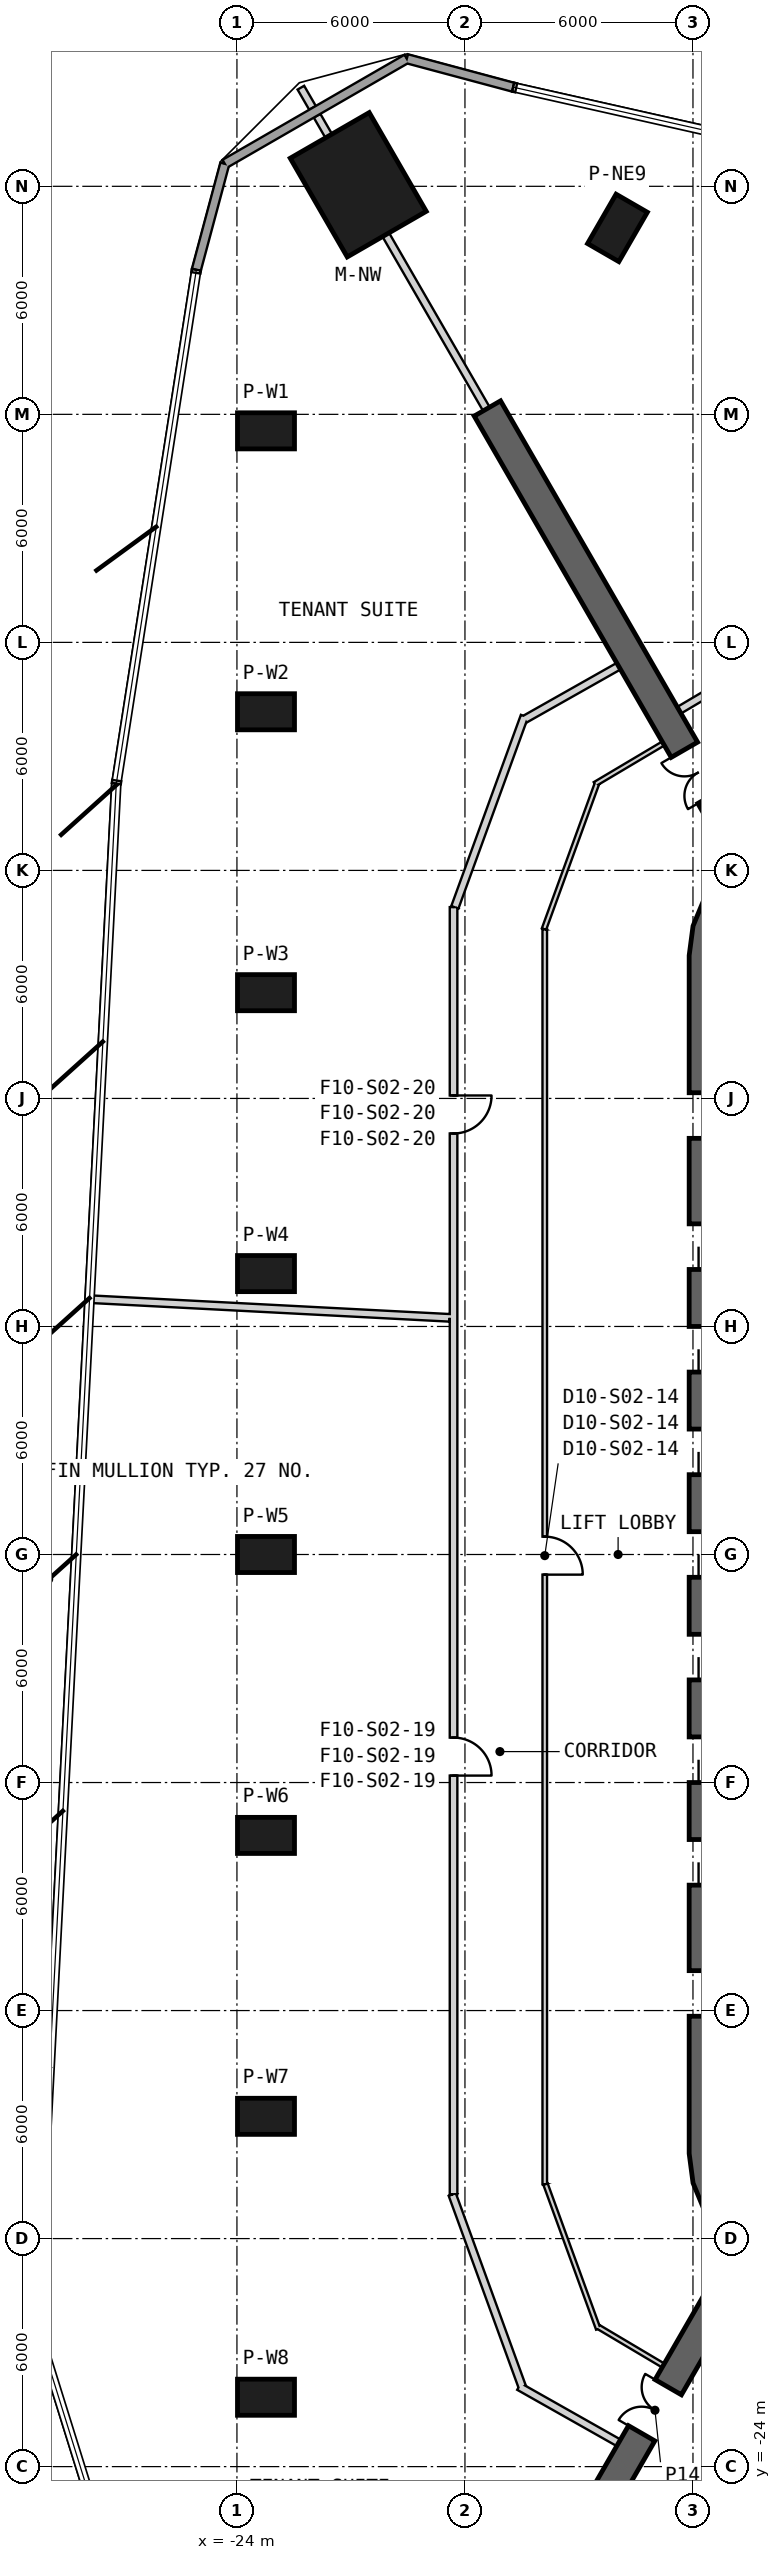
"""IFC4 building model, lengths in metres.
Left out: names, types, materials, properties, quantities, classifications, styles, units other than length and angle.
Written with IfcOpenShell. Run it as: python <this file> out.ifc"""

import sys

from ifc_helpers import new_model, si_unit, direction, frame, frame_2d, origin, origin_2d, place, context, subcontext, project, spatial, polyline, rectangle, outline, extrude, element, fill, save


model = new_model("IFC4")
c1 = context("Model", 3, precision=1e-05, world=origin(), true_north=direction((0.0, 1.0)))
c2 = subcontext(c1, "Body", "Model", "MODEL_VIEW")
j1 = project(units=[si_unit("LENGTHUNIT", "METRE"), si_unit("PLANEANGLEUNIT", "RADIAN")], contexts=[c1])
p1 = place(None, origin())
s1 = spatial("IfcSite", under=j1, at=p1, CompositionType="ELEMENT")
p2 = place(p1, origin())
s2 = spatial("IfcBuilding", under=s1, at=p2, CompositionType="ELEMENT")
p3 = place(p2, frame((0.0, 0.0, 70.1)))
s3 = spatial("IfcBuildingStorey", under=s2, at=p3, CompositionType="ELEMENT", Elevation=70.1)
p4 = place(p3, frame((-20.808, 36.041, 0.0), z_axis=(0.0, 0.0, 1.0), x_axis=(-0.5, 0.866025403784, 0.0)))
e1 = element("IfcColumn", 1, at=p4, inside=s3, PredefinedType="COLUMN", context=c2, shape_type="SweptSolid", body=[
    extrude(rectangle(XDim=3.0, YDim=2.4, at=origin_2d()), origin(), (0.0, 0.0, 1.0), 4.1),
])
for number, where, z_axis, x_axis in (
    (2, (-23.236, 29.566, 0.0), (0.0, 0.0, 1.0), (-1.0, 0.0, 0.0)),
    (3, (-23.236, 22.174, 0.0), (0.0, 0.0, 1.0), (-1.0, 0.0, 0.0)),
    (4, (-23.236, 14.783, 0.0), (0.0, 0.0, 1.0), (-1.0, 0.0, 0.0)),
    (5, (-23.236, 7.391, 0.0), (0.0, 0.0, 1.0), (-1.0, 0.0, 0.0)),
    (6, (-23.236, 0.0, 0.0), (0.0, 0.0, 1.0), (-1.0, 0.0, 0.0)),
    (7, (-23.236, -7.391, 0.0), (0.0, 0.0, 1.0), (-1.0, 0.0, 0.0)),
    (8, (-23.236, -14.783, 0.0), (0.0, 0.0, 1.0), (-1.0, 0.0, 0.0)),
    (9, (-23.236, -22.174, 0.0), (0.0, 0.0, 1.0), (-1.0, 0.0, 0.0)),
    (10, (-13.987, 34.906, 0.0), (0.0, 0.0, 1.0), (0.5, 0.866, 0.0)),
):
    element("IfcColumn", number, at=place(p3, frame(where, z_axis=z_axis, x_axis=x_axis)), inside=s3, PredefinedType="COLUMN", context=c2, shape_type="SweptSolid", body=[
        extrude(rectangle(XDim=1.5, YDim=0.95, at=origin_2d()), origin(), (0.0, 0.0, 1.0), 4.1),
    ])
p5 = place(p3, frame((-11.65, 15.762, 0.0), z_axis=(0.0, 0.0, 1.0), x_axis=(0.0, -1.0, 0.0)))
e11 = element("IfcWall", 11, at=p5, inside=s3, PredefinedType="SHEAR", context=c2, shape_type="SweptSolid", body=[
    extrude(rectangle(XDim=31.523, YDim=0.9, at=frame_2d((15.762, 0.0))), origin(), (0.0, 0.0, 1.0), 4.1),
])
p6 = place(p5, frame((7.062, 0.0, 0.0)))
e12 = element("IfcOpeningElement", 12, at=p6, cuts=e11, PredefinedType="OPENING", context=c2, shape_type="SweptSolid", body=[
    extrude(rectangle(XDim=1.2, YDim=2.4, at=frame_2d((0.6, 1.2))), frame((0.0, 0.46, 0.0), z_axis=(0.0, -1.0, 0.0), x_axis=(1.0, 0.0, 0.0)), (0.0, 0.0, 1.0), 0.92),
])
p7 = place(p5, frame((9.762, 0.0, 0.0)))
e13 = element("IfcOpeningElement", 13, at=p7, cuts=e11, PredefinedType="OPENING", context=c2, shape_type="SweptSolid", body=[
    extrude(rectangle(XDim=1.2, YDim=2.4, at=frame_2d((0.6, 1.2))), frame((0.0, 0.46, 0.0), z_axis=(0.0, -1.0, 0.0), x_axis=(1.0, 0.0, 0.0)), (0.0, 0.0, 1.0), 0.92),
])
p8 = place(p5, frame((12.462, 0.0, 0.0)))
e14 = element("IfcOpeningElement", 14, at=p8, cuts=e11, PredefinedType="OPENING", context=c2, shape_type="SweptSolid", body=[
    extrude(rectangle(XDim=1.2, YDim=2.4, at=frame_2d((0.6, 1.2))), frame((0.0, 0.46, 0.0), z_axis=(0.0, -1.0, 0.0), x_axis=(1.0, 0.0, 0.0)), (0.0, 0.0, 1.0), 0.92),
])
p9 = place(p5, frame((15.162, 0.0, 0.0)))
e15 = element("IfcOpeningElement", 15, at=p9, cuts=e11, PredefinedType="OPENING", context=c2, shape_type="SweptSolid", body=[
    extrude(rectangle(XDim=1.2, YDim=2.4, at=frame_2d((0.6, 1.2))), frame((0.0, 0.46, 0.0), z_axis=(0.0, -1.0, 0.0), x_axis=(1.0, 0.0, 0.0)), (0.0, 0.0, 1.0), 0.92),
])
p10 = place(p5, frame((17.862, 0.0, 0.0)))
e16 = element("IfcOpeningElement", 16, at=p10, cuts=e11, PredefinedType="OPENING", context=c2, shape_type="SweptSolid", body=[
    extrude(rectangle(XDim=1.2, YDim=2.4, at=frame_2d((0.6, 1.2))), frame((0.0, 0.46, 0.0), z_axis=(0.0, -1.0, 0.0), x_axis=(1.0, 0.0, 0.0)), (0.0, 0.0, 1.0), 0.92),
])
p11 = place(p5, frame((20.562, 0.0, 0.0)))
e17 = element("IfcOpeningElement", 17, at=p11, cuts=e11, PredefinedType="OPENING", context=c2, shape_type="SweptSolid", body=[
    extrude(rectangle(XDim=1.2, YDim=2.4, at=frame_2d((0.6, 1.2))), frame((0.0, 0.46, 0.0), z_axis=(0.0, -1.0, 0.0), x_axis=(1.0, 0.0, 0.0)), (0.0, 0.0, 1.0), 0.92),
])
p12 = place(p5, frame((23.262, 0.0, 0.0)))
e18 = element("IfcOpeningElement", 18, at=p12, cuts=e11, PredefinedType="OPENING", context=c2, shape_type="SweptSolid", body=[
    extrude(rectangle(XDim=1.2, YDim=2.4, at=frame_2d((0.6, 1.2))), frame((0.0, 0.46, 0.0), z_axis=(0.0, -1.0, 0.0), x_axis=(1.0, 0.0, 0.0)), (0.0, 0.0, 1.0), 0.92),
])
p13 = place(p5, frame((3.612, 0.0, 0.0)))
e19 = element("IfcOpeningElement", 19, at=p13, cuts=e11, PredefinedType="OPENING", context=c2, shape_type="SweptSolid", body=[
    extrude(rectangle(XDim=1.2, YDim=2.4, at=frame_2d((0.6, 1.2))), frame((0.0, 0.46, 0.0), z_axis=(0.0, -1.0, 0.0), x_axis=(1.0, 0.0, 0.0)), (0.0, 0.0, 1.0), 0.92),
])
p14 = place(p5, frame((26.712, 0.0, 0.0)))
e20 = element("IfcOpeningElement", 20, at=p14, cuts=e11, PredefinedType="OPENING", context=c2, shape_type="SweptSolid", body=[
    extrude(rectangle(XDim=1.2, YDim=2.4, at=frame_2d((0.6, 1.2))), frame((0.0, 0.46, 0.0), z_axis=(0.0, -1.0, 0.0), x_axis=(1.0, 0.0, 0.0)), (0.0, 0.0, 1.0), 0.92),
])
p15 = place(p3, origin())
e21 = element("IfcWall", 21, at=p15, inside=s3, PredefinedType="SHEAR", context=c2, shape_type="SweptSolid", body=[
    extrude(outline(polyline([(-7.6, 18.36), (-8.323, 18.659), (-9.1, 18.762), (-9.876, 18.659), (-10.6, 18.36), (-11.221, 17.883), (-11.698, 17.262), (-11.998, 16.538), (-12.1, 15.762), (-11.2, 15.762), (-11.128, 16.305), (-10.919, 16.812), (-10.585, 17.247), (-10.15, 17.58), (-9.644, 17.79), (-9.1, 17.862), (-8.556, 17.79), (-8.05, 17.58), (-7.6, 18.36)])), origin(), (0.0, 0.0, 1.0), 4.1),
])
p16 = place(p3, origin())
e22 = element("IfcWall", 22, at=p16, inside=s3, PredefinedType="SHEAR", context=c2, shape_type="SweptSolid", body=[
    extrude(outline(polyline([(-12.1, -15.762), (-11.998, -16.538), (-11.698, -17.262), (-11.221, -17.883), (-10.6, -18.36), (-9.876, -18.659), (-9.1, -18.762), (-8.323, -18.659), (-7.6, -18.36), (-8.05, -17.58), (-8.556, -17.79), (-9.1, -17.862), (-9.644, -17.79), (-10.15, -17.58), (-10.585, -17.247), (-10.919, -16.812), (-11.128, -16.305), (-11.2, -15.762), (-12.1, -15.762)])), origin(), (0.0, 0.0, 1.0), 4.1),
])
p17 = place(p3, frame((-10.575, 18.316, 0.0), z_axis=(0.0, 0.0, 1.0), x_axis=(-0.499998162141, 0.86602646487, 0.0)))
e23 = element("IfcWall", 23, at=p17, inside=s3, PredefinedType="SHEAR", context=c2, shape_type="SweptSolid", body=[
    extrude(rectangle(XDim=13.669, YDim=0.8, at=frame_2d((6.835, 0.0))), origin(), (0.0, 0.0, 1.0), 4.1),
])
p18 = place(p17, frame((1.9, 0.0, 0.0)))
e24 = element("IfcOpeningElement", 24, at=p18, cuts=e23, PredefinedType="OPENING", context=c2, shape_type="SweptSolid", body=[
    extrude(rectangle(XDim=1.4, YDim=2.4, at=frame_2d((0.7, 1.2))), frame((0.0, 0.41, 0.0), z_axis=(0.0, -1.0, 0.0), x_axis=(1.0, 0.0, 0.0)), (0.0, 0.0, 1.0), 0.82),
])
p19 = place(p3, frame((-10.575, -18.316, 0.0), z_axis=(0.0, 0.0, 1.0), x_axis=(-0.499998162141, -0.86602646487, 0.0)))
e25 = element("IfcWall", 25, at=p19, inside=s3, PredefinedType="SHEAR", context=c2, shape_type="SweptSolid", body=[
    extrude(rectangle(XDim=13.669, YDim=0.8, at=frame_2d((6.835, 0.0))), origin(), (0.0, 0.0, 1.0), 4.1),
])
p20 = place(p19, frame((4.15, 0.0, 0.0)))
e26 = element("IfcOpeningElement", 26, at=p20, cuts=e25, PredefinedType="OPENING", context=c2, shape_type="SweptSolid", body=[
    extrude(rectangle(XDim=1.4, YDim=2.4, at=frame_2d((0.7, 1.2))), frame((0.0, 0.41, 0.0), z_axis=(0.0, -1.0, 0.0), x_axis=(1.0, 0.0, 0.0)), (0.0, 0.0, 1.0), 0.82),
])
p21 = place(p3, frame((-16.731, 38.609, 0.0), z_axis=(0.0, 0.0, 1.0), x_axis=(-0.965920971701, 0.258837161991, 0.0)))
e27 = element("IfcWall", 27, at=p21, inside=s3, PredefinedType="SOLIDWALL", context=c2, shape_type="SweptSolid", body=[
    extrude(rectangle(XDim=2.897, YDim=0.24, at=frame_2d((1.449, 0.0))), origin(), (0.0, 0.0, 1.0), 3.8),
])
p22 = place(p3, frame((-19.53, 39.359, 0.0), z_axis=(0.0, 0.0, 1.0), x_axis=(-0.866017993231, -0.500012835235, 0.0)))
e28 = element("IfcWall", 28, at=p22, inside=s3, PredefinedType="SOLIDWALL", context=c2, shape_type="SweptSolid", body=[
    extrude(rectangle(XDim=5.531, YDim=0.24, at=frame_2d((2.766, 0.0))), origin(), (0.0, 0.0, 1.0), 3.8),
])
p23 = place(p3, frame((-24.32, 36.593, 0.0), z_axis=(0.0, 0.0, 1.0), x_axis=(-0.258867040904, -0.965912964575, 0.0)))
e29 = element("IfcWall", 29, at=p23, inside=s3, PredefinedType="SOLIDWALL", context=c2, shape_type="SweptSolid", body=[
    extrude(rectangle(XDim=2.889, YDim=0.24, at=frame_2d((1.444, 0.0))), origin(), (0.0, 0.0, 1.0), 3.8),
])
p24 = place(p3, frame((-12.782, 21.339, 0.0), z_axis=(0.0, 0.0, 1.0), x_axis=(-0.859769901207, -0.510681619973, 0.0)))
e30 = element("IfcWall", 30, at=p24, inside=s3, PredefinedType="PARTITIONING", context=c2, shape_type="SweptSolid", body=[
    extrude(rectangle(XDim=2.093, YDim=0.12, at=frame_2d((1.046, 0.0))), origin(), (0.0, 0.0, 1.0), 3.8),
])
p25 = place(p3, frame((-14.528, 20.282, 0.0), z_axis=(0.0, 0.0, 1.0), x_axis=(-0.341969257767, -0.939711140054, 0.0)))
e31 = element("IfcWall", 31, at=p25, inside=s3, PredefinedType="PARTITIONING", context=c2, shape_type="SweptSolid", body=[
    extrude(rectangle(XDim=4.073, YDim=0.12, at=frame_2d((2.037, 0.0))), origin(), (0.0, 0.0, 1.0), 2.88),
])
p26 = place(p3, frame((-15.9, 16.451, 0.0), z_axis=(0.0, 0.0, 1.0), x_axis=(0.0, -1.0, 0.0)))
e32 = element("IfcWall", 32, at=p26, inside=s3, PredefinedType="PARTITIONING", context=c2, shape_type="SweptSolid", body=[
    extrude(rectangle(XDim=33.022, YDim=0.12, at=frame_2d((16.511, 0.0))), origin(), (0.0, 0.0, 1.0), 2.98),
])
p27 = place(p26, frame((15.981, 0.0, 0.0)))
e33 = element("IfcOpeningElement", 33, at=p27, cuts=e32, PredefinedType="OPENING", context=c2, shape_type="SweptSolid", body=[
    extrude(rectangle(XDim=1.0, YDim=2.1, at=frame_2d((0.5, 1.05))), frame((0.0, 0.07, 0.0), z_axis=(0.0, -1.0, 0.0), x_axis=(1.0, 0.0, 0.0)), (0.0, 0.0, 1.0), 0.14),
])
p28 = place(p3, frame((-15.879, -16.567, 0.0), z_axis=(0.0, 0.0, 1.0), x_axis=(0.341999322503, -0.939700198685, 0.0)))
e34 = element("IfcWall", 34, at=p28, inside=s3, PredefinedType="PARTITIONING", context=c2, shape_type="SweptSolid", body=[
    extrude(rectangle(XDim=4.054, YDim=0.12, at=frame_2d((2.027, 0.0))), origin(), (0.0, 0.0, 1.0), 2.88),
])
p29 = place(p3, frame((-14.494, -20.322, 0.0), z_axis=(0.0, 0.0, 1.0), x_axis=(0.859745408261, -0.510722853389, 0.0)))
e35 = element("IfcWall", 35, at=p29, inside=s3, PredefinedType="PARTITIONING", context=c2, shape_type="SweptSolid", body=[
    extrude(rectangle(XDim=1.991, YDim=0.12, at=frame_2d((0.996, 0.0))), origin(), (0.0, 0.0, 1.0), 3.8),
])
p30 = place(p3, frame((-16.576, -21.892, 0.0), z_axis=(0.0, 0.0, 1.0), x_axis=(0.870559817111, -0.492062602553, 0.0)))
e36 = element("IfcWall", 36, at=p30, inside=s3, PredefinedType="PARTITIONING", context=c2, shape_type="SweptSolid", body=[
    extrude(rectangle(XDim=3.01, YDim=0.2, at=frame_2d((1.505, 0.0))), origin(), (0.0, 0.0, 1.0), 3.8),
])
p31 = place(p3, frame((-18.334, -16.84, 0.0), z_axis=(0.0, 0.0, 1.0), x_axis=(0.342015877493, -0.939694173411, 0.0)))
e37 = element("IfcWall", 37, at=p31, inside=s3, PredefinedType="PARTITIONING", context=c2, shape_type="SweptSolid", body=[
    extrude(rectangle(XDim=5.389, YDim=0.2, at=frame_2d((2.694, 0.0))), origin(), (0.0, 0.0, 1.0), 2.88),
])
p32 = place(p3, frame((-18.3, 17.034, 0.0), z_axis=(0.0, 0.0, 1.0), x_axis=(0.0, -1.0, 0.0)))
e38 = element("IfcWall", 38, at=p32, inside=s3, PredefinedType="PARTITIONING", context=c2, shape_type="SweptSolid", body=[
    extrude(rectangle(XDim=10.835, YDim=0.2, at=frame_2d((5.417, 0.0))), origin(), (0.0, 0.0, 1.0), 3.08),
])
p33 = place(p32, frame((4.956, 0.0, 0.0)))
e39 = element("IfcOpeningElement", 39, at=p33, cuts=e38, PredefinedType="OPENING", context=c2, shape_type="SweptSolid", body=[
    extrude(rectangle(XDim=1.0, YDim=2.1, at=frame_2d((0.5, 1.05))), frame((0.0, 0.11, 0.0), z_axis=(0.0, -1.0, 0.0), x_axis=(1.0, 0.0, 0.0)), (0.0, 0.0, 1.0), 0.22),
])
p34 = place(p3, frame((-18.3, 6.199, 0.0), z_axis=(0.0, 0.0, 1.0), x_axis=(0.0, -1.0, 0.0)))
e40 = element("IfcWall", 40, at=p34, inside=s3, PredefinedType="PARTITIONING", context=c2, shape_type="SweptSolid", body=[
    extrude(rectangle(XDim=23.033, YDim=0.2, at=frame_2d((11.517, 0.0))), origin(), (0.0, 0.0, 1.0), 3.08),
])
p35 = place(p34, frame((11.017, 0.0, 0.0)))
e41 = element("IfcOpeningElement", 41, at=p35, cuts=e40, PredefinedType="OPENING", context=c2, shape_type="SweptSolid", body=[
    extrude(rectangle(XDim=1.0, YDim=2.1, at=frame_2d((0.5, 1.05))), frame((0.0, 0.11, 0.0), z_axis=(0.0, -1.0, 0.0), x_axis=(1.0, 0.0, 0.0)), (0.0, 0.0, 1.0), 0.22),
])
p36 = place(p3, frame((-16.435, 22.06, 0.0), z_axis=(0.0, 0.0, 1.0), x_axis=(-0.342032279434, -0.939688203515, 0.0)))
e42 = element("IfcWall", 42, at=p36, inside=s3, PredefinedType="PARTITIONING", context=c2, shape_type="SweptSolid", body=[
    extrude(rectangle(XDim=5.354, YDim=0.2, at=frame_2d((2.677, 0.0))), origin(), (0.0, 0.0, 1.0), 2.88),
])
p37 = place(p3, frame((-13.956, 23.373, 0.0), z_axis=(0.0, 0.0, 1.0), x_axis=(-0.870578825461, -0.492028971361, 0.0)))
e43 = element("IfcWall", 43, at=p37, inside=s3, PredefinedType="PARTITIONING", context=c2, shape_type="SweptSolid", body=[
    extrude(rectangle(XDim=2.844, YDim=0.2, at=frame_2d((1.422, 0.0))), origin(), (0.0, 0.0, 1.0), 3.8),
])
p38 = place(p3, frame((-10.339, 23.415, 0.0), z_axis=(0.0, 0.0, 1.0), x_axis=(-0.860316803263, -0.509759745393, 0.0)))
e44 = element("IfcWall", 44, at=p38, inside=s3, PredefinedType="PARTITIONING", context=c2, shape_type="SweptSolid", body=[
    extrude(rectangle(XDim=2.354, YDim=0.2, at=frame_2d((1.177, 0.0))), origin(), (0.0, 0.0, 1.0), 3.8),
])
p39 = place(p3, frame((-18.4, 6.227, 0.0), z_axis=(0.0, 0.0, 1.0), x_axis=(-0.998654739652, 0.051852781702, 0.0)))
e45 = element("IfcWall", 45, at=p39, inside=s3, PredefinedType="PARTITIONING", context=c2, shape_type="SweptSolid", body=[
    extrude(rectangle(XDim=9.492, YDim=0.2, at=frame_2d((4.746, 0.0))), origin(), (0.0, 0.0, 1.0), 3.08),
])
p40 = place(p3, frame((-22.318, 38.596, 0.0), z_axis=(0.0, 0.0, 1.0), x_axis=(0.500078582497, -0.865980029404, 0.0)))
e46 = element("IfcWall", 46, at=p40, inside=s3, PredefinedType="PARTITIONING", context=c2, shape_type="SweptSolid", body=[
    extrude(rectangle(XDim=0.613, YDim=0.2, at=frame_2d((0.307, 0.0))), origin(), (0.0, 0.0, 1.0), 3.8),
])
p41 = place(p3, frame((-21.891, 37.857, 0.0), z_axis=(0.0, 0.0, 1.0), x_axis=(0.49994015576, -0.866059952115, 0.0)))
e47 = element("IfcWall", 47, at=p41, inside=s3, PredefinedType="PARTITIONING", context=c2, shape_type="SweptSolid", body=[
    extrude(rectangle(XDim=0.615, YDim=0.2, at=frame_2d((0.307, 0.0))), origin(), (0.0, 0.0, 1.0), 3.8),
])
p42 = place(p3, frame((-20.084, 34.727, 0.0), z_axis=(0.0, 0.0, 1.0), x_axis=(0.499991120112, -0.86603053053, 0.0)))
e48 = element("IfcWall", 48, at=p42, inside=s3, PredefinedType="PARTITIONING", context=c2, shape_type="SweptSolid", body=[
    extrude(rectangle(XDim=5.296, YDim=0.2, at=frame_2d((2.648, 0.0))), origin(), (0.0, 0.0, 1.0), 3.37),
])
p43 = place(p27, origin())
e49 = element("IfcDoor", 49, at=p43, inside=s3, OperationType="SINGLE_SWING_RIGHT", PredefinedType="NOTDEFINED", context=c2, shape_type="SweptSolid", body=[
    extrude(rectangle(XDim=1.0, YDim=2.1, at=frame_2d((0.5, 1.05))), frame((0.0, 0.025, 0.0), z_axis=(0.0, -1.0, 0.0), x_axis=(1.0, 0.0, 0.0)), (0.0, 0.0, 1.0), 0.05),
])
fill(e33, e49)
p44 = place(p35, origin())
e50 = element("IfcDoor", 50, at=p44, inside=s3, OperationType="SINGLE_SWING_LEFT", PredefinedType="USERDEFINED", context=c2, shape_type="SweptSolid", body=[
    extrude(rectangle(XDim=1.0, YDim=2.1, at=frame_2d((0.5, 1.05))), frame((0.0, 0.025, 0.0), z_axis=(0.0, -1.0, 0.0), x_axis=(1.0, 0.0, 0.0)), (0.0, 0.0, 1.0), 0.05),
])
fill(e41, e50)
p45 = place(p33, origin())
e51 = element("IfcDoor", 51, at=p45, inside=s3, OperationType="SINGLE_SWING_RIGHT", PredefinedType="USERDEFINED", context=c2, shape_type="SweptSolid", body=[
    extrude(rectangle(XDim=1.0, YDim=2.1, at=frame_2d((0.5, 1.05))), frame((0.0, 0.025, 0.0), z_axis=(0.0, -1.0, 0.0), x_axis=(1.0, 0.0, 0.0)), (0.0, 0.0, 1.0), 0.05),
])
fill(e39, e51)
p46 = place(p18, origin())
e52 = element("IfcDoor", 52, at=p46, inside=s3, OperationType="DOUBLE_DOOR_SINGLE_SWING", PredefinedType="NOTDEFINED", context=c2, shape_type="SweptSolid", body=[
    extrude(rectangle(XDim=1.4, YDim=2.4, at=frame_2d((0.7, 1.2))), frame((0.0, 0.025, 0.0), z_axis=(0.0, -1.0, 0.0), x_axis=(1.0, 0.0, 0.0)), (0.0, 0.0, 1.0), 0.05),
])
fill(e24, e52)
p47 = place(p20, origin())
e53 = element("IfcDoor", 53, at=p47, inside=s3, OperationType="DOUBLE_DOOR_SINGLE_SWING", PredefinedType="NOTDEFINED", context=c2, shape_type="SweptSolid", body=[
    extrude(rectangle(XDim=1.4, YDim=2.4, at=frame_2d((0.7, 1.2))), frame((0.0, 0.025, 0.0), z_axis=(0.0, -1.0, 0.0), x_axis=(1.0, 0.0, 0.0)), (0.0, 0.0, 1.0), 0.05),
])
fill(e26, e53)
save(model, sys.argv[1])
